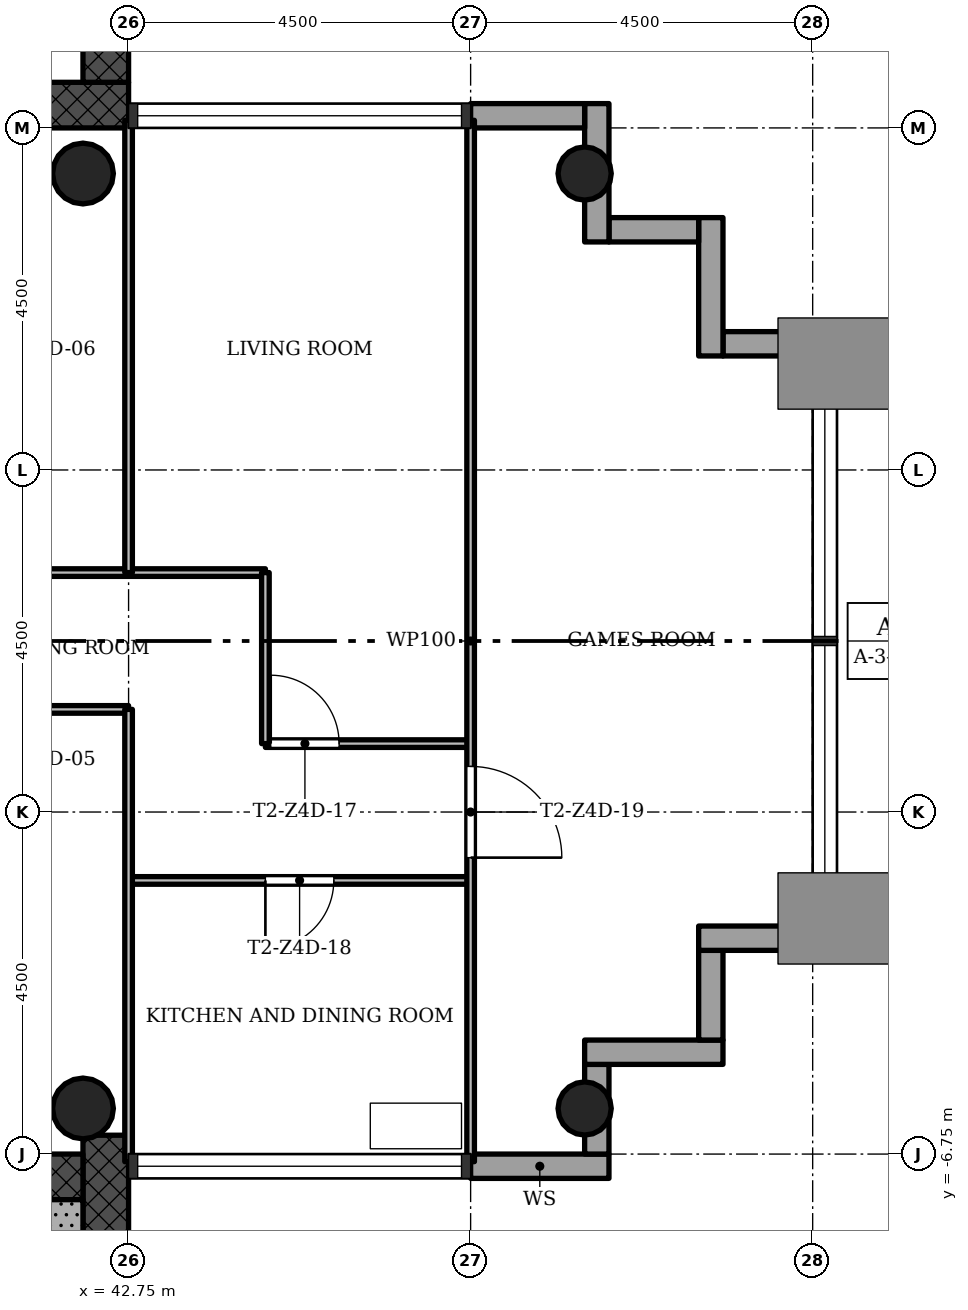
"""IFC4 building model, lengths in metres.
Left out: names, types, materials, properties, quantities, classifications, styles, units other than length and angle.
Written with IfcOpenShell. Run it as: python <this file> out.ifc"""

import sys

from ifc_helpers import new_model, si_unit, direction, frame, frame_2d, origin, origin_2d, place, context, subcontext, project, spatial, rectangle, hollow_circle, extrude, element, fill, save


model = new_model("IFC4")
c1 = context("Model", 3, precision=1e-05, world=origin(), true_north=direction((0.0, 1.0)))
c2 = subcontext(c1, "Body", "Model", "MODEL_VIEW")
j1 = project(units=[si_unit("LENGTHUNIT", "METRE"), si_unit("PLANEANGLEUNIT", "RADIAN")], contexts=[c1])
p1 = place(None, origin())
s1 = spatial("IfcSite", under=j1, at=p1, CompositionType="ELEMENT")
p2 = place(p1, origin())
s2 = spatial("IfcBuilding", under=s1, at=p2, CompositionType="ELEMENT")
p3 = place(p2, frame((0.0, 0.0, 202.8)))
s3 = spatial("IfcBuildingStorey", under=s2, at=p3, CompositionType="ELEMENT", Elevation=202.8)
p4 = place(p3, frame((29.85, 7.05, 0.0), z_axis=(0.0, 0.0, 1.0), x_axis=(1.0, 0.0, 0.0)))
e1 = element("IfcWall", 1, at=p4, inside=s3, PredefinedType="SHEAR", context=c2, shape_type="SweptSolid", body=[
    extrude(rectangle(XDim=12.9, YDim=0.6, at=frame_2d((6.45, 0.0))), origin(), (0.0, 0.0, 1.0), 3.4),
])
p5 = place(p4, frame((5.25, 0.0, 0.0)))
e2 = element("IfcOpeningElement", 2, at=p5, cuts=e1, PredefinedType="OPENING", context=c2, shape_type="SweptSolid", body=[
    extrude(rectangle(XDim=1.8, YDim=2.1, at=frame_2d((0.9, 1.05))), frame((0.0, 0.31, 0.0), z_axis=(0.0, -1.0, 0.0), x_axis=(1.0, 0.0, 0.0)), (0.0, 0.0, 1.0), 0.62),
])
p6 = place(p3, frame((42.45, 7.35, 0.0), z_axis=(0.0, 0.0, 1.0), x_axis=(0.0, 1.0, 0.0)))
e3 = element("IfcWall", 3, at=p6, inside=s3, PredefinedType="SHEAR", context=c2, shape_type="SweptSolid", body=[
    extrude(rectangle(XDim=8.4, YDim=0.6, at=frame_2d((4.2, 0.0))), origin(), (0.0, 0.0, 1.0), 3.4),
])
p7 = place(p3, frame((42.45, -15.15, 0.0), z_axis=(0.0, 0.0, 1.0), x_axis=(0.0, 1.0, 0.0)))
e4 = element("IfcWall", 4, at=p7, inside=s3, PredefinedType="SHEAR", context=c2, shape_type="SweptSolid", body=[
    extrude(rectangle(XDim=8.648, YDim=0.6, at=frame_2d((4.324, 0.0))), origin(), (0.0, 0.0, 1.0), 3.4),
])
p8 = place(p3, frame((42.15, -7.05, 0.0), z_axis=(0.0, 0.0, 1.0), x_axis=(-1.0, 0.0, 0.0)))
e5 = element("IfcWall", 5, at=p8, inside=s3, PredefinedType="SHEAR", context=c2, shape_type="SweptSolid", body=[
    extrude(rectangle(XDim=12.9, YDim=0.6, at=frame_2d((6.45, 0.0))), origin(), (0.0, 0.0, 1.0), 3.4),
])
p9 = place(p8, frame((5.25, 0.0, 0.0)))
e6 = element("IfcOpeningElement", 6, at=p9, cuts=e5, PredefinedType="OPENING", context=c2, shape_type="SweptSolid", body=[
    extrude(rectangle(XDim=1.8, YDim=2.1, at=frame_2d((0.9, 1.05))), frame((0.0, 0.31, 0.0), z_axis=(0.0, -1.0, 0.0), x_axis=(1.0, 0.0, 0.0)), (0.0, 0.0, 1.0), 0.62),
])
for number, where, z_axis, x_axis in (
    (7, (48.75, -6.15, 0.0), (0.0, 0.0, 1.0), (1.0, 0.0, 0.0)),
    (8, (48.75, 6.15, 0.0), (0.0, 0.0, 1.0), (1.0, 0.0, 0.0)),
):
    element("IfcColumn", number, at=place(p3, frame(where, z_axis=z_axis, x_axis=x_axis)), inside=s3, PredefinedType="COLUMN", context=c2, shape_type="SweptSolid", body=[
        extrude(hollow_circle(Radius=0.35, WallThickness=0.025, at=origin_2d()), origin(), (0.0, 0.0, 1.0), 3.4),
    ])
for number, where, z_axis, x_axis in (
    (9, (42.15, -6.15, 0.0), (0.0, 0.0, 1.0), (1.0, 0.0, 0.0)),
    (10, (42.15, 6.15, 0.0), (0.0, 0.0, 1.0), (1.0, 0.0, 0.0)),
):
    element("IfcColumn", number, at=place(p3, frame(where, z_axis=z_axis, x_axis=x_axis)), inside=s3, PredefinedType="COLUMN", context=c2, shape_type="SweptSolid", body=[
        extrude(hollow_circle(Radius=0.4, WallThickness=0.028, at=origin_2d()), origin(), (0.0, 0.0, 1.0), 3.4),
    ])
p10 = place(p3, frame((47.25, -6.91, -0.3), z_axis=(0.0, 0.0, 1.0), x_axis=(1.0, 0.0, 0.0)))
e11 = element("IfcWall", 11, at=p10, inside=s3, PredefinedType="STANDARD", context=c2, shape_type="SweptSolid", body=[
    extrude(rectangle(XDim=1.82, YDim=0.32, at=frame_2d((0.91, 0.0))), origin(), (0.0, 0.0, 1.0), 3.4),
])
p11 = place(p3, frame((48.91, -6.75, -0.3), z_axis=(0.0, 0.0, 1.0), x_axis=(0.0, 1.0, 0.0)))
e12 = element("IfcWall", 12, at=p11, inside=s3, PredefinedType="STANDARD", context=c2, shape_type="SweptSolid", body=[
    extrude(rectangle(XDim=1.18, YDim=0.32, at=frame_2d((0.59, 0.0))), origin(), (0.0, 0.0, 1.0), 3.4),
])
p12 = place(p3, frame((48.75, -5.41, -0.3), z_axis=(0.0, 0.0, 1.0), x_axis=(1.0, 0.0, 0.0)))
e13 = element("IfcWall", 13, at=p12, inside=s3, PredefinedType="STANDARD", context=c2, shape_type="SweptSolid", body=[
    extrude(rectangle(XDim=1.82, YDim=0.32, at=frame_2d((0.91, 0.0))), origin(), (0.0, 0.0, 1.0), 3.4),
])
p13 = place(p3, frame((50.41, -5.25, -0.3), z_axis=(0.0, 0.0, 1.0), x_axis=(0.0, 1.0, 0.0)))
e14 = element("IfcWall", 14, at=p13, inside=s3, PredefinedType="STANDARD", context=c2, shape_type="SweptSolid", body=[
    extrude(rectangle(XDim=1.18, YDim=0.32, at=frame_2d((0.59, 0.0))), origin(), (0.0, 0.0, 1.0), 3.4),
])
p14 = place(p3, frame((50.25, -3.91, -0.3), z_axis=(0.0, 0.0, 1.0), x_axis=(1.0, 0.0, 0.0)))
e15 = element("IfcWall", 15, at=p14, inside=s3, PredefinedType="STANDARD", context=c2, shape_type="SweptSolid", body=[
    extrude(rectangle(XDim=1.82, YDim=0.32, at=frame_2d((0.91, 0.0))), origin(), (0.0, 0.0, 1.0), 3.4),
])
p15 = place(p3, frame((52.07, 3.91, -0.3), z_axis=(0.0, 0.0, 1.0), x_axis=(-1.0, 0.0, 0.0)))
e16 = element("IfcWall", 16, at=p15, inside=s3, PredefinedType="STANDARD", context=c2, shape_type="SweptSolid", body=[
    extrude(rectangle(XDim=1.5, YDim=0.32, at=frame_2d((0.75, 0.0))), origin(), (0.0, 0.0, 1.0), 3.4),
])
p16 = place(p3, frame((50.41, 3.75, -0.3), z_axis=(0.0, 0.0, 1.0), x_axis=(0.0, 1.0, 0.0)))
e17 = element("IfcWall", 17, at=p16, inside=s3, PredefinedType="STANDARD", context=c2, shape_type="SweptSolid", body=[
    extrude(rectangle(XDim=1.82, YDim=0.32, at=frame_2d((0.91, 0.0))), origin(), (0.0, 0.0, 1.0), 3.4),
])
p17 = place(p3, frame((50.25, 5.41, -0.3), z_axis=(0.0, 0.0, 1.0), x_axis=(-1.0, 0.0, 0.0)))
e18 = element("IfcWall", 18, at=p17, inside=s3, PredefinedType="STANDARD", context=c2, shape_type="SweptSolid", body=[
    extrude(rectangle(XDim=1.18, YDim=0.32, at=frame_2d((0.59, 0.0))), origin(), (0.0, 0.0, 1.0), 3.4),
])
p18 = place(p3, frame((48.91, 5.25, -0.3), z_axis=(0.0, 0.0, 1.0), x_axis=(0.0, 1.0, 0.0)))
e19 = element("IfcWall", 19, at=p18, inside=s3, PredefinedType="STANDARD", context=c2, shape_type="SweptSolid", body=[
    extrude(rectangle(XDim=1.82, YDim=0.32, at=frame_2d((0.91, 0.0))), origin(), (0.0, 0.0, 1.0), 3.4),
])
p19 = place(p3, frame((48.75, 6.91, -0.3), z_axis=(0.0, 0.0, 1.0), x_axis=(-1.0, 0.0, 0.0)))
e20 = element("IfcWall", 20, at=p19, inside=s3, PredefinedType="STANDARD", context=c2, shape_type="SweptSolid", body=[
    extrude(rectangle(XDim=1.5, YDim=0.32, at=frame_2d((0.75, 0.0))), origin(), (0.0, 0.0, 1.0), 3.4),
])
p20 = place(p3, frame((47.25, -3.15, 0.0), z_axis=(0.0, 0.0, 1.0), x_axis=(-1.0, 0.0, 0.0)))
e21 = element("IfcWall", 21, at=p20, inside=s3, PredefinedType="PARTITIONING", context=c2, shape_type="SweptSolid", body=[
    extrude(rectangle(XDim=4.5, YDim=0.1, at=frame_2d((2.25, 0.0))), origin(), (0.0, 0.0, 1.0), 3.0),
])
p21 = place(p20, frame((1.8, 0.0, 0.0)))
e22 = element("IfcOpeningElement", 22, at=p21, cuts=e21, PredefinedType="OPENING", context=c2, shape_type="SweptSolid", body=[
    extrude(rectangle(XDim=0.9, YDim=2.1, at=frame_2d((0.45, 1.05))), frame((0.0, 0.06, 0.0), z_axis=(0.0, -1.0, 0.0), x_axis=(1.0, 0.0, 0.0)), (0.0, 0.0, 1.0), 0.12),
])
p22 = place(p3, frame((47.25, -1.35, 0.0), z_axis=(0.0, 0.0, 1.0), x_axis=(-1.0, 0.0, 0.0)))
e23 = element("IfcWall", 23, at=p22, inside=s3, PredefinedType="PARTITIONING", context=c2, shape_type="SweptSolid", body=[
    extrude(rectangle(XDim=2.7, YDim=0.1, at=frame_2d((1.35, 0.0))), origin(), (0.0, 0.0, 1.0), 3.0),
])
p23 = place(p22, frame((1.73, 0.0, 0.0)))
e24 = element("IfcOpeningElement", 24, at=p23, cuts=e23, PredefinedType="OPENING", context=c2, shape_type="SweptSolid", body=[
    extrude(rectangle(XDim=0.9, YDim=2.1, at=frame_2d((0.45, 1.05))), frame((0.0, 0.06, 0.0), z_axis=(0.0, -1.0, 0.0), x_axis=(1.0, 0.0, 0.0)), (0.0, 0.0, 1.0), 0.12),
])
p24 = place(p3, frame((42.75, -0.9, 0.0), z_axis=(0.0, 0.0, 1.0), x_axis=(-1.0, 0.0, 0.0)))
e25 = element("IfcWall", 25, at=p24, inside=s3, PredefinedType="PARTITIONING", context=c2, shape_type="SweptSolid", body=[
    extrude(rectangle(XDim=2.25, YDim=0.1, at=frame_2d((1.125, 0.0))), origin(), (0.0, 0.0, 1.0), 3.0),
])
p25 = place(p3, frame((44.55, 0.9, 0.0), z_axis=(0.0, 0.0, 1.0), x_axis=(-1.0, 0.0, 0.0)))
e26 = element("IfcWall", 26, at=p25, inside=s3, PredefinedType="PARTITIONING", context=c2, shape_type="SweptSolid", body=[
    extrude(rectangle(XDim=4.05, YDim=0.1, at=frame_2d((2.025, 0.0))), origin(), (0.0, 0.0, 1.0), 3.0),
])
p26 = place(p3, frame((47.25, -6.85, 0.0), z_axis=(0.0, 0.0, 1.0), x_axis=(0.0, 1.0, 0.0)))
e27 = element("IfcWall", 27, at=p26, inside=s3, PredefinedType="PARTITIONING", context=c2, shape_type="SweptSolid", body=[
    extrude(rectangle(XDim=13.7, YDim=0.1, at=frame_2d((6.85, 0.0))), origin(), (0.0, 0.0, 1.0), 3.0),
])
p27 = place(p26, frame((4.0, 0.0, 0.0)))
e28 = element("IfcOpeningElement", 28, at=p27, cuts=e27, PredefinedType="OPENING", context=c2, shape_type="SweptSolid", body=[
    extrude(rectangle(XDim=1.2, YDim=2.1, at=frame_2d((0.6, 1.05))), frame((0.0, 0.06, 0.0), z_axis=(0.0, -1.0, 0.0), x_axis=(1.0, 0.0, 0.0)), (0.0, 0.0, 1.0), 0.12),
])
p28 = place(p3, frame((44.55, -1.35, 0.0), z_axis=(0.0, 0.0, 1.0), x_axis=(0.0, 1.0, 0.0)))
e29 = element("IfcWall", 29, at=p28, inside=s3, PredefinedType="PARTITIONING", context=c2, shape_type="SweptSolid", body=[
    extrude(rectangle(XDim=2.25, YDim=0.1, at=frame_2d((1.125, 0.0))), origin(), (0.0, 0.0, 1.0), 3.0),
])
for number, where, z_axis, x_axis in (
    (30, (42.75, -6.85, 0.0), (0.0, 0.0, 1.0), (0.0, 1.0, 0.0)),
    (31, (42.75, 0.9, 0.0), (0.0, 0.0, 1.0), (0.0, 1.0, 0.0)),
):
    element("IfcWall", number, at=place(p3, frame(where, z_axis=z_axis, x_axis=x_axis)), inside=s3, PredefinedType="PARTITIONING", context=c2, shape_type="SweptSolid", body=[
        extrude(rectangle(XDim=5.95, YDim=0.1, at=frame_2d((2.975, 0.0))), origin(), (0.0, 0.0, 1.0), 3.0),
    ])
p29 = place(p3, frame((37.85, -7.65, 0.0), z_axis=(0.0, 0.0, 1.0), x_axis=(1.0, 0.0, 0.0)))
e32 = element("IfcWall", 32, at=p29, inside=s3, PredefinedType="SHEAR", context=c2, shape_type="SweptSolid", body=[
    extrude(rectangle(XDim=4.3, YDim=0.6, at=frame_2d((2.15, 0.0))), origin(), (0.0, 0.0, 1.0), 3.4),
])
p30 = place(p23, origin())
e33 = element("IfcDoor", 33, at=p30, inside=s3, OperationType="SINGLE_SWING_RIGHT", PredefinedType="DOOR", context=c2, shape_type="SweptSolid", body=[
    extrude(rectangle(XDim=0.9, YDim=2.1, at=frame_2d((0.45, 1.05))), frame((0.0, 0.025, 0.0), z_axis=(0.0, -1.0, 0.0), x_axis=(1.0, 0.0, 0.0)), (0.0, 0.0, 1.0), 0.05),
])
fill(e24, e33)
p31 = place(p21, origin())
e34 = element("IfcDoor", 34, at=p31, inside=s3, OperationType="SINGLE_SWING_LEFT", PredefinedType="DOOR", context=c2, shape_type="SweptSolid", body=[
    extrude(rectangle(XDim=0.9, YDim=2.1, at=frame_2d((0.45, 1.05))), frame((0.0, 0.025, 0.0), z_axis=(0.0, -1.0, 0.0), x_axis=(1.0, 0.0, 0.0)), (0.0, 0.0, 1.0), 0.05),
])
fill(e22, e34)
p32 = place(p27, origin())
e35 = element("IfcDoor", 35, at=p32, inside=s3, OperationType="SINGLE_SWING_LEFT", PredefinedType="DOOR", context=c2, shape_type="SweptSolid", body=[
    extrude(rectangle(XDim=1.2, YDim=2.1, at=frame_2d((0.6, 1.05))), frame((0.0, 0.025, 0.0), z_axis=(0.0, -1.0, 0.0), x_axis=(1.0, 0.0, 0.0)), (0.0, 0.0, 1.0), 0.05),
])
fill(e28, e35)
save(model, sys.argv[1])
